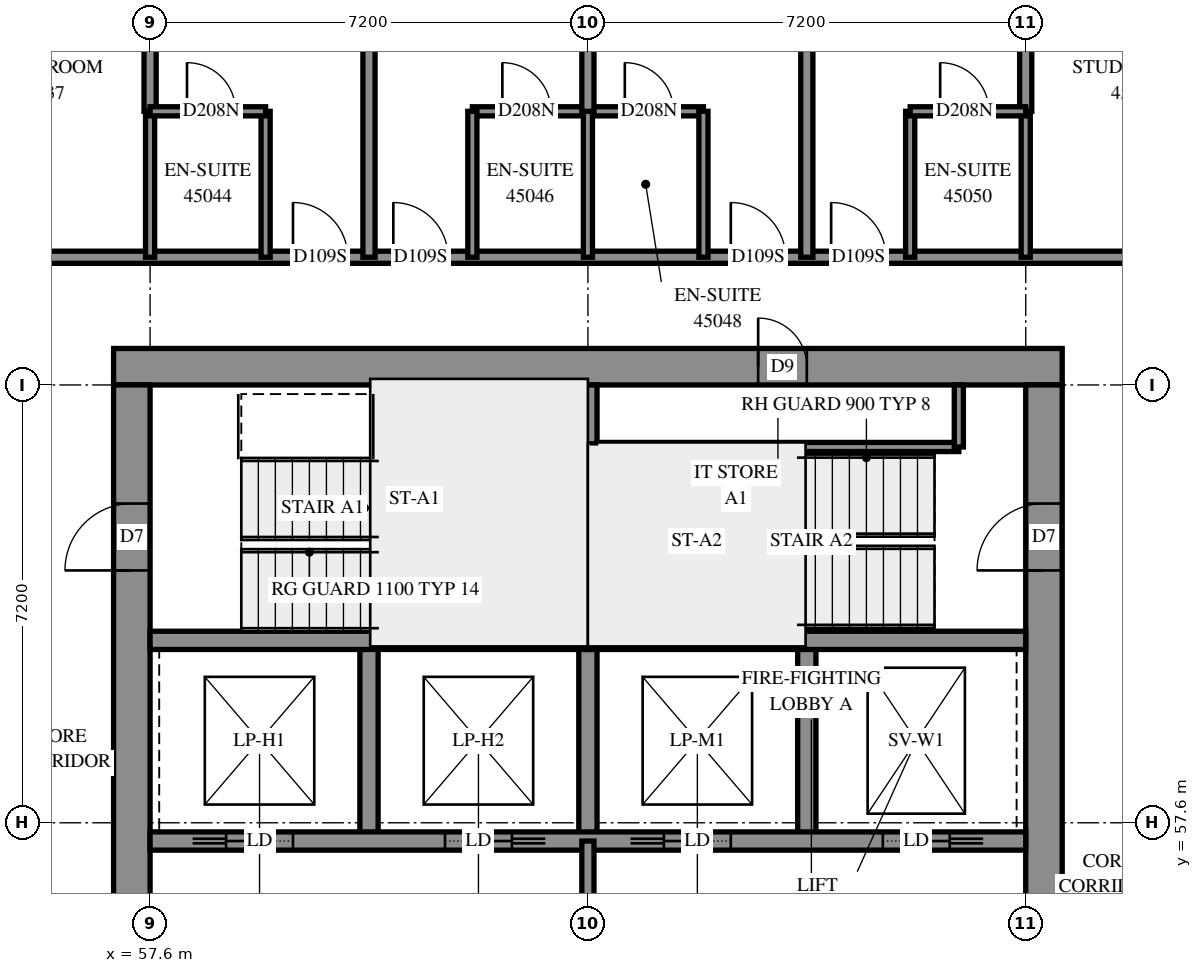
"""IFC4 building model, lengths in metres.
Left out: names, types, materials, properties, quantities, classifications, styles, units other than length and angle.
Written with IfcOpenShell. Run it as: python <this file> out.ifc"""

import sys

from ifc_helpers import new_model, si_unit, direction, frame, frame_2d, origin, place, context, subcontext, project, spatial, rectangle, extrude, element, fill, save


model = new_model("IFC4")
c1 = context("Model", 3, precision=1e-05, world=origin(), true_north=direction((0.0, 1.0)))
c2 = subcontext(c1, "Body", "Model", "MODEL_VIEW")
j1 = project(units=[si_unit("LENGTHUNIT", "METRE"), si_unit("PLANEANGLEUNIT", "RADIAN")], contexts=[c1])
p1 = place(None, origin())
s1 = spatial("IfcSite", under=j1, at=p1, CompositionType="ELEMENT")
p2 = place(p1, origin())
s2 = spatial("IfcBuilding", under=s1, at=p2, CompositionType="ELEMENT")
p3 = place(p2, frame((0.0, 0.0, 166.0)))
s3 = spatial("IfcBuildingStorey", under=s2, at=p3, CompositionType="ELEMENT", Elevation=166.0)
p4 = place(p3, frame((57.0, 65.1, -0.3), z_axis=(0.0, 0.0, 1.0), x_axis=(1.0, 0.0, 0.0)))
e1 = element("IfcWall", 1, at=p4, inside=s3, PredefinedType="SHEAR", context=c2, shape_type="SweptSolid", body=[
    extrude(rectangle(XDim=15.6, YDim=0.6, at=frame_2d((7.8, 0.0))), origin(), (0.0, 0.0, 1.0), 2.7),
])
p5 = place(p4, frame((10.6, 0.0, 0.3)))
e2 = element("IfcOpeningElement", 2, at=p5, cuts=e1, PredefinedType="OPENING", context=c2, shape_type="SweptSolid", body=[
    extrude(rectangle(XDim=0.8, YDim=2.1, at=frame_2d((0.4, 1.05))), frame((0.0, 0.31, 0.0), z_axis=(0.0, -1.0, 0.0), x_axis=(1.0, 0.0, 0.0)), (0.0, 0.0, 1.0), 0.62),
])
p6 = place(p3, frame((57.3, 50.4, -0.3), z_axis=(0.0, 0.0, 1.0), x_axis=(0.0, 1.0, 0.0)))
e3 = element("IfcWall", 3, at=p6, inside=s3, PredefinedType="SHEAR", context=c2, shape_type="SweptSolid", body=[
    extrude(rectangle(XDim=14.4, YDim=0.6, at=frame_2d((7.2, 0.0))), origin(), (0.0, 0.0, 1.0), 2.7),
])
p7 = place(p6, frame((4.55, 0.0, 0.3)))
e4 = element("IfcOpeningElement", 4, at=p7, cuts=e3, PredefinedType="OPENING", context=c2, shape_type="SweptSolid", body=[
    extrude(rectangle(XDim=1.1, YDim=2.1, at=frame_2d((0.55, 1.05))), frame((0.0, 0.31, 0.0), z_axis=(0.0, -1.0, 0.0), x_axis=(1.0, 0.0, 0.0)), (0.0, 0.0, 1.0), 0.62),
])
p8 = place(p6, frame((11.35, 0.0, 0.3)))
e5 = element("IfcOpeningElement", 5, at=p8, cuts=e3, PredefinedType="OPENING", context=c2, shape_type="SweptSolid", body=[
    extrude(rectangle(XDim=1.1, YDim=2.1, at=frame_2d((0.55, 1.05))), frame((0.0, 0.31, 0.0), z_axis=(0.0, -1.0, 0.0), x_axis=(1.0, 0.0, 0.0)), (0.0, 0.0, 1.0), 0.62),
])
p9 = place(p3, frame((72.3, 50.4, -0.3), z_axis=(0.0, 0.0, 1.0), x_axis=(0.0, 1.0, 0.0)))
e6 = element("IfcWall", 6, at=p9, inside=s3, PredefinedType="SHEAR", context=c2, shape_type="SweptSolid", body=[
    extrude(rectangle(XDim=14.4, YDim=0.6, at=frame_2d((7.2, 0.0))), origin(), (0.0, 0.0, 1.0), 2.7),
])
p10 = place(p9, frame((4.55, 0.0, 0.3)))
e7 = element("IfcOpeningElement", 7, at=p10, cuts=e6, PredefinedType="OPENING", context=c2, shape_type="SweptSolid", body=[
    extrude(rectangle(XDim=1.1, YDim=2.1, at=frame_2d((0.55, 1.05))), frame((0.0, 0.31, 0.0), z_axis=(0.0, -1.0, 0.0), x_axis=(1.0, 0.0, 0.0)), (0.0, 0.0, 1.0), 0.62),
])
p11 = place(p9, frame((11.35, 0.0, 0.3)))
e8 = element("IfcOpeningElement", 8, at=p11, cuts=e6, PredefinedType="OPENING", context=c2, shape_type="SweptSolid", body=[
    extrude(rectangle(XDim=1.1, YDim=2.1, at=frame_2d((0.55, 1.05))), frame((0.0, 0.31, 0.0), z_axis=(0.0, -1.0, 0.0), x_axis=(1.0, 0.0, 0.0)), (0.0, 0.0, 1.0), 0.62),
])
for number, where, z_axis, x_axis in (
    (9, (61.2, 57.3, 0.0), (0.0, 0.0, 1.0), (0.0, 1.0, 0.0)),
    (10, (64.8, 57.3, 0.0), (0.0, 0.0, 1.0), (0.0, 1.0, 0.0)),
    (11, (68.4, 57.3, 0.0), (0.0, 0.0, 1.0), (0.0, 1.0, 0.0)),
):
    element("IfcWall", number, at=place(p3, frame(where, z_axis=z_axis, x_axis=x_axis)), inside=s3, PredefinedType="SOLIDWALL", context=c2, shape_type="SweptSolid", body=[
        extrude(rectangle(XDim=3.3, YDim=0.3, at=frame_2d((1.65, 0.0))), origin(), (0.0, 0.0, 1.0), 3.1),
    ])
p12 = place(p3, frame((57.6, 57.3, 0.0), z_axis=(0.0, 0.0, 1.0), x_axis=(1.0, 0.0, 0.0)))
e12 = element("IfcWall", 12, at=p12, inside=s3, PredefinedType="SOLIDWALL", context=c2, shape_type="SweptSolid", body=[
    extrude(rectangle(XDim=14.4, YDim=0.3, at=frame_2d((7.2, 0.0))), origin(), (0.0, 0.0, 1.0), 3.1),
])
p13 = place(p12, frame((1.25, 0.0, 0.0)))
e13 = element("IfcOpeningElement", 13, at=p13, cuts=e12, PredefinedType="OPENING", context=c2, shape_type="SweptSolid", body=[
    extrude(rectangle(XDim=1.1, YDim=2.1, at=frame_2d((0.55, 1.05))), frame((0.0, 0.16, 0.0), z_axis=(0.0, -1.0, 0.0), x_axis=(1.0, 0.0, 0.0)), (0.0, 0.0, 1.0), 0.32),
])
p14 = place(p12, frame((4.85, 0.0, 0.0)))
e14 = element("IfcOpeningElement", 14, at=p14, cuts=e12, PredefinedType="OPENING", context=c2, shape_type="SweptSolid", body=[
    extrude(rectangle(XDim=1.1, YDim=2.1, at=frame_2d((0.55, 1.05))), frame((0.0, 0.16, 0.0), z_axis=(0.0, -1.0, 0.0), x_axis=(1.0, 0.0, 0.0)), (0.0, 0.0, 1.0), 0.32),
])
p15 = place(p12, frame((8.45, 0.0, 0.0)))
e15 = element("IfcOpeningElement", 15, at=p15, cuts=e12, PredefinedType="OPENING", context=c2, shape_type="SweptSolid", body=[
    extrude(rectangle(XDim=1.1, YDim=2.1, at=frame_2d((0.55, 1.05))), frame((0.0, 0.16, 0.0), z_axis=(0.0, -1.0, 0.0), x_axis=(1.0, 0.0, 0.0)), (0.0, 0.0, 1.0), 0.32),
])
p16 = place(p12, frame((12.05, 0.0, 0.0)))
e16 = element("IfcOpeningElement", 16, at=p16, cuts=e12, PredefinedType="OPENING", context=c2, shape_type="SweptSolid", body=[
    extrude(rectangle(XDim=1.1, YDim=2.1, at=frame_2d((0.55, 1.05))), frame((0.0, 0.16, 0.0), z_axis=(0.0, -1.0, 0.0), x_axis=(1.0, 0.0, 0.0)), (0.0, 0.0, 1.0), 0.32),
])
for number, where, z_axis, x_axis in (
    (17, (57.6, 60.6, 0.0), (0.0, 0.0, 1.0), (1.0, 0.0, 0.0)),
    (18, (64.8, 60.6, 0.0), (0.0, 0.0, 1.0), (1.0, 0.0, 0.0)),
):
    element("IfcWall", number, at=place(p3, frame(where, z_axis=z_axis, x_axis=x_axis)), inside=s3, PredefinedType="SOLIDWALL", context=c2, shape_type="SweptSolid", body=[
        extrude(rectangle(XDim=7.2, YDim=0.3, at=frame_2d((3.6, 0.0))), origin(), (0.0, 0.0, 1.0), 3.1),
    ])
p17 = place(p3, frame((64.8, 60.6, 0.0), z_axis=(0.0, 0.0, 1.0), x_axis=(0.0, 1.0, 0.0)))
e19 = element("IfcWall", 19, at=p17, inside=s3, PredefinedType="SOLIDWALL", context=c2, shape_type="SweptSolid", body=[
    extrude(rectangle(XDim=4.2, YDim=0.3, at=frame_2d((2.1, 0.0))), origin(), (0.0, 0.0, 1.0), 3.1),
])
p18 = place(p3, frame((64.95, 63.78, 0.0), z_axis=(0.0, 0.0, 1.0), x_axis=(1.0, 0.0, 0.0)))
e20 = element("IfcWall", 20, at=p18, inside=s3, PredefinedType="PARTITIONING", context=c2, shape_type="SweptSolid", body=[
    extrude(rectangle(XDim=5.95, YDim=0.15, at=frame_2d((2.975, 0.0))), origin(), (0.0, 0.0, 1.0), 3.1),
])
p19 = place(p3, frame((70.9, 63.78, 0.0), z_axis=(0.0, 0.0, 1.0), x_axis=(0.0, 1.0, 0.0)))
e21 = element("IfcWall", 21, at=p19, inside=s3, PredefinedType="PARTITIONING", context=c2, shape_type="SweptSolid", body=[
    extrude(rectangle(XDim=1.02, YDim=0.15, at=frame_2d((0.51, 0.0))), origin(), (0.0, 0.0, 1.0), 3.1),
])
p20 = place(p3, frame((64.8, 53.7, 0.0), z_axis=(0.0, 0.0, 1.0), x_axis=(0.0, 1.0, 0.0)))
e22 = element("IfcWall", 22, at=p20, inside=s3, PredefinedType="PARTITIONING", context=c2, shape_type="SweptSolid", body=[
    extrude(rectangle(XDim=3.6, YDim=0.2, at=frame_2d((1.8, 0.0))), origin(), (0.0, 0.0, 1.0), 3.1),
])
p21 = place(p3, frame((55.5, 66.9, 0.0), z_axis=(0.0, 0.0, 1.0), x_axis=(1.0, 0.0, 0.0)))
e23 = element("IfcWall", 23, at=p21, inside=s3, PredefinedType="PARTITIONING", context=c2, shape_type="SweptSolid", body=[
    extrude(rectangle(XDim=18.6, YDim=0.2, at=frame_2d((9.3, 0.0))), origin(), (0.0, 0.0, 1.0), 3.1),
])
p22 = place(p21, frame((4.45, 0.0, 0.0)))
e24 = element("IfcOpeningElement", 24, at=p22, cuts=e23, PredefinedType="OPENING", context=c2, shape_type="SweptSolid", body=[
    extrude(rectangle(XDim=0.9, YDim=2.1, at=frame_2d((0.45, 1.05))), frame((0.0, 0.11, 0.0), z_axis=(0.0, -1.0, 0.0), x_axis=(1.0, 0.0, 0.0)), (0.0, 0.0, 1.0), 0.22),
])
p23 = place(p21, frame((6.1, 0.0, 0.0)))
e25 = element("IfcOpeningElement", 25, at=p23, cuts=e23, PredefinedType="OPENING", context=c2, shape_type="SweptSolid", body=[
    extrude(rectangle(XDim=0.9, YDim=2.1, at=frame_2d((0.45, 1.05))), frame((0.0, 0.11, 0.0), z_axis=(0.0, -1.0, 0.0), x_axis=(1.0, 0.0, 0.0)), (0.0, 0.0, 1.0), 0.22),
])
p24 = place(p21, frame((11.65, 0.0, 0.0)))
e26 = element("IfcOpeningElement", 26, at=p24, cuts=e23, PredefinedType="OPENING", context=c2, shape_type="SweptSolid", body=[
    extrude(rectangle(XDim=0.9, YDim=2.1, at=frame_2d((0.45, 1.05))), frame((0.0, 0.11, 0.0), z_axis=(0.0, -1.0, 0.0), x_axis=(1.0, 0.0, 0.0)), (0.0, 0.0, 1.0), 0.22),
])
p25 = place(p21, frame((13.3, 0.0, 0.0)))
e27 = element("IfcOpeningElement", 27, at=p25, cuts=e23, PredefinedType="OPENING", context=c2, shape_type="SweptSolid", body=[
    extrude(rectangle(XDim=0.9, YDim=2.1, at=frame_2d((0.45, 1.05))), frame((0.0, 0.11, 0.0), z_axis=(0.0, -1.0, 0.0), x_axis=(1.0, 0.0, 0.0)), (0.0, 0.0, 1.0), 0.22),
])
p26 = place(p3, frame((68.4, 66.9, 0.0), z_axis=(0.0, 0.0, 1.0), x_axis=(0.0, 1.0, 0.0)))
e28 = element("IfcWall", 28, at=p26, inside=s3, PredefinedType="PARTITIONING", context=c2, shape_type="SweptSolid", body=[
    extrude(rectangle(XDim=5.848, YDim=0.2, at=frame_2d((2.924, 0.0))), origin(), (0.0, 0.0, 1.0), 3.1),
])
p27 = place(p3, frame((61.2, 66.9, 0.0), z_axis=(0.0, 0.0, 1.0), x_axis=(0.0, 1.0, 0.0)))
e29 = element("IfcWall", 29, at=p27, inside=s3, PredefinedType="PARTITIONING", context=c2, shape_type="SweptSolid", body=[
    extrude(rectangle(XDim=5.804, YDim=0.2, at=frame_2d((2.902, 0.0))), origin(), (0.0, 0.0, 1.0), 3.1),
])
p28 = place(p3, frame((62.9, 69.3, 0.0), z_axis=(0.0, 0.0, 1.0), x_axis=(1.0, 0.0, 0.0)))
e30 = element("IfcWall", 30, at=p28, inside=s3, PredefinedType="PARTITIONING", context=c2, shape_type="SweptSolid", body=[
    extrude(rectangle(XDim=3.8, YDim=0.15, at=frame_2d((1.9, 0.0))), origin(), (0.0, 0.0, 1.0), 3.1),
])
p29 = place(p28, frame((0.493, 0.0, 0.0)))
e31 = element("IfcOpeningElement", 31, at=p29, cuts=e30, PredefinedType="OPENING", context=c2, shape_type="SweptSolid", body=[
    extrude(rectangle(XDim=0.8, YDim=2.1, at=frame_2d((0.4, 1.05))), frame((0.0, 0.085, 0.0), z_axis=(0.0, -1.0, 0.0), x_axis=(1.0, 0.0, 0.0)), (0.0, 0.0, 1.0), 0.17),
])
p30 = place(p28, frame((2.507, 0.0, 0.0)))
e32 = element("IfcOpeningElement", 32, at=p30, cuts=e30, PredefinedType="OPENING", context=c2, shape_type="SweptSolid", body=[
    extrude(rectangle(XDim=0.8, YDim=2.1, at=frame_2d((0.4, 1.05))), frame((0.0, 0.085, 0.0), z_axis=(0.0, -1.0, 0.0), x_axis=(1.0, 0.0, 0.0)), (0.0, 0.0, 1.0), 0.17),
])
for number, where, z_axis, x_axis in (
    (33, (57.6, 66.9, 0.0), (0.0, 0.0, 1.0), (0.0, 1.0, 0.0)),
    (34, (59.5, 66.9, 0.0), (0.0, 0.0, 1.0), (0.0, 1.0, 0.0)),
    (35, (62.9, 66.9, 0.0), (0.0, 0.0, 1.0), (0.0, 1.0, 0.0)),
    (36, (64.8, 66.9, 0.0), (0.0, 0.0, 1.0), (0.0, 1.0, 0.0)),
    (37, (66.7, 66.9, 0.0), (0.0, 0.0, 1.0), (0.0, 1.0, 0.0)),
    (38, (70.1, 66.9, 0.0), (0.0, 0.0, 1.0), (0.0, 1.0, 0.0)),
    (39, (72.0, 66.9, 0.0), (0.0, 0.0, 1.0), (0.0, 1.0, 0.0)),
):
    element("IfcWall", number, at=place(p3, frame(where, z_axis=z_axis, x_axis=x_axis)), inside=s3, PredefinedType="PARTITIONING", context=c2, shape_type="SweptSolid", body=[
        extrude(rectangle(XDim=2.4, YDim=0.15, at=frame_2d((1.2, 0.0))), origin(), (0.0, 0.0, 1.0), 3.1),
    ])
for number, where, z_axis, x_axis in (
    (40, (57.6, 69.3, 0.0), (0.0, 0.0, 1.0), (0.0, 1.0, 0.0)),
    (41, (64.8, 69.3, 0.0), (0.0, 0.0, 1.0), (0.0, 1.0, 0.0)),
    (42, (72.0, 69.3, 0.0), (0.0, 0.0, 1.0), (0.0, 1.0, 0.0)),
):
    element("IfcWall", number, at=place(p3, frame(where, z_axis=z_axis, x_axis=x_axis)), inside=s3, PredefinedType="PARTITIONING", context=c2, shape_type="SweptSolid", body=[
        extrude(rectangle(XDim=2.25, YDim=0.2, at=frame_2d((1.125, 0.0))), origin(), (0.0, 0.0, 1.0), 3.1),
    ])
p31 = place(p3, frame((70.1, 69.3, 0.0), z_axis=(0.0, 0.0, 1.0), x_axis=(1.0, 0.0, 0.0)))
e43 = element("IfcWall", 43, at=p31, inside=s3, PredefinedType="PARTITIONING", context=c2, shape_type="SweptSolid", body=[
    extrude(rectangle(XDim=1.9, YDim=0.15, at=frame_2d((0.95, 0.0))), origin(), (0.0, 0.0, 1.0), 3.1),
])
p32 = place(p31, frame((0.493, 0.0, 0.0)))
e44 = element("IfcOpeningElement", 44, at=p32, cuts=e43, PredefinedType="OPENING", context=c2, shape_type="SweptSolid", body=[
    extrude(rectangle(XDim=0.8, YDim=2.1, at=frame_2d((0.4, 1.05))), frame((0.0, 0.085, 0.0), z_axis=(0.0, -1.0, 0.0), x_axis=(1.0, 0.0, 0.0)), (0.0, 0.0, 1.0), 0.17),
])
p33 = place(p3, frame((57.6, 69.3, 0.0), z_axis=(0.0, 0.0, 1.0), x_axis=(1.0, 0.0, 0.0)))
e45 = element("IfcWall", 45, at=p33, inside=s3, PredefinedType="PARTITIONING", context=c2, shape_type="SweptSolid", body=[
    extrude(rectangle(XDim=1.9, YDim=0.15, at=frame_2d((0.95, 0.0))), origin(), (0.0, 0.0, 1.0), 3.1),
])
p34 = place(p33, frame((0.607, 0.0, 0.0)))
e46 = element("IfcOpeningElement", 46, at=p34, cuts=e45, PredefinedType="OPENING", context=c2, shape_type="SweptSolid", body=[
    extrude(rectangle(XDim=0.8, YDim=2.1, at=frame_2d((0.4, 1.05))), frame((0.0, 0.085, 0.0), z_axis=(0.0, -1.0, 0.0), x_axis=(1.0, 0.0, 0.0)), (0.0, 0.0, 1.0), 0.17),
])
p35 = place(p5, origin())
e47 = element("IfcDoor", 47, at=p35, inside=s3, OperationType="SINGLE_SWING_RIGHT", PredefinedType="DOOR", context=c2, shape_type="SweptSolid", body=[
    extrude(rectangle(XDim=0.8, YDim=2.1, at=frame_2d((0.4, 1.05))), frame((0.0, 0.025, 0.0), z_axis=(0.0, -1.0, 0.0), x_axis=(1.0, 0.0, 0.0)), (0.0, 0.0, 1.0), 0.05),
])
fill(e2, e47)
p36 = place(p8, origin())
e48 = element("IfcDoor", 48, at=p36, inside=s3, OperationType="SINGLE_SWING_LEFT", PredefinedType="DOOR", context=c2, shape_type="SweptSolid", body=[
    extrude(rectangle(XDim=1.1, YDim=2.1, at=frame_2d((0.55, 1.05))), frame((0.0, 0.025, 0.0), z_axis=(0.0, -1.0, 0.0), x_axis=(1.0, 0.0, 0.0)), (0.0, 0.0, 1.0), 0.05),
])
fill(e5, e48)
p37 = place(p11, origin())
e49 = element("IfcDoor", 49, at=p37, inside=s3, OperationType="SINGLE_SWING_RIGHT", PredefinedType="DOOR", context=c2, shape_type="SweptSolid", body=[
    extrude(rectangle(XDim=1.1, YDim=2.1, at=frame_2d((0.55, 1.05))), frame((0.0, 0.025, 0.0), z_axis=(0.0, -1.0, 0.0), x_axis=(1.0, 0.0, 0.0)), (0.0, 0.0, 1.0), 0.05),
])
fill(e8, e49)
p38 = place(p13, origin())
e50 = element("IfcDoor", 50, at=p38, inside=s3, OperationType="SLIDING_TO_LEFT", PredefinedType="DOOR", context=c2, shape_type="SweptSolid", body=[
    extrude(rectangle(XDim=1.1, YDim=2.1, at=frame_2d((0.55, 1.05))), frame((0.0, 0.025, 0.0), z_axis=(0.0, -1.0, 0.0), x_axis=(1.0, 0.0, 0.0)), (0.0, 0.0, 1.0), 0.05),
])
fill(e13, e50)
p39 = place(p14, origin())
e51 = element("IfcDoor", 51, at=p39, inside=s3, OperationType="SLIDING_TO_RIGHT", PredefinedType="DOOR", context=c2, shape_type="SweptSolid", body=[
    extrude(rectangle(XDim=1.1, YDim=2.1, at=frame_2d((0.55, 1.05))), frame((0.0, 0.025, 0.0), z_axis=(0.0, -1.0, 0.0), x_axis=(1.0, 0.0, 0.0)), (0.0, 0.0, 1.0), 0.05),
])
fill(e14, e51)
p40 = place(p15, origin())
e52 = element("IfcDoor", 52, at=p40, inside=s3, OperationType="SLIDING_TO_LEFT", PredefinedType="DOOR", context=c2, shape_type="SweptSolid", body=[
    extrude(rectangle(XDim=1.1, YDim=2.1, at=frame_2d((0.55, 1.05))), frame((0.0, 0.025, 0.0), z_axis=(0.0, -1.0, 0.0), x_axis=(1.0, 0.0, 0.0)), (0.0, 0.0, 1.0), 0.05),
])
fill(e15, e52)
p41 = place(p16, origin())
e53 = element("IfcDoor", 53, at=p41, inside=s3, OperationType="SLIDING_TO_RIGHT", PredefinedType="DOOR", context=c2, shape_type="SweptSolid", body=[
    extrude(rectangle(XDim=1.1, YDim=2.1, at=frame_2d((0.55, 1.05))), frame((0.0, 0.025, 0.0), z_axis=(0.0, -1.0, 0.0), x_axis=(1.0, 0.0, 0.0)), (0.0, 0.0, 1.0), 0.05),
])
fill(e16, e53)
p42 = place(p22, origin())
e54 = element("IfcDoor", 54, at=p42, inside=s3, OperationType="SINGLE_SWING_RIGHT", PredefinedType="DOOR", context=c2, shape_type="SweptSolid", body=[
    extrude(rectangle(XDim=0.9, YDim=2.1, at=frame_2d((0.45, 1.05))), frame((0.0, 0.025, 0.0), z_axis=(0.0, -1.0, 0.0), x_axis=(1.0, 0.0, 0.0)), (0.0, 0.0, 1.0), 0.05),
])
fill(e24, e54)
p43 = place(p34, origin())
e55 = element("IfcDoor", 55, at=p43, inside=s3, OperationType="SINGLE_SWING_RIGHT", PredefinedType="DOOR", context=c2, shape_type="SweptSolid", body=[
    extrude(rectangle(XDim=0.8, YDim=2.1, at=frame_2d((0.4, 1.05))), frame((0.0, 0.025, 0.0), z_axis=(0.0, -1.0, 0.0), x_axis=(1.0, 0.0, 0.0)), (0.0, 0.0, 1.0), 0.05),
])
fill(e46, e55)
p44 = place(p23, origin())
e56 = element("IfcDoor", 56, at=p44, inside=s3, OperationType="SINGLE_SWING_LEFT", PredefinedType="DOOR", context=c2, shape_type="SweptSolid", body=[
    extrude(rectangle(XDim=0.9, YDim=2.1, at=frame_2d((0.45, 1.05))), frame((0.0, 0.025, 0.0), z_axis=(0.0, -1.0, 0.0), x_axis=(1.0, 0.0, 0.0)), (0.0, 0.0, 1.0), 0.05),
])
fill(e25, e56)
p45 = place(p29, origin())
e57 = element("IfcDoor", 57, at=p45, inside=s3, OperationType="SINGLE_SWING_RIGHT", PredefinedType="DOOR", context=c2, shape_type="SweptSolid", body=[
    extrude(rectangle(XDim=0.8, YDim=2.1, at=frame_2d((0.4, 1.05))), frame((0.0, 0.025, 0.0), z_axis=(0.0, -1.0, 0.0), x_axis=(1.0, 0.0, 0.0)), (0.0, 0.0, 1.0), 0.05),
])
fill(e31, e57)
p46 = place(p24, origin())
e58 = element("IfcDoor", 58, at=p46, inside=s3, OperationType="SINGLE_SWING_RIGHT", PredefinedType="DOOR", context=c2, shape_type="SweptSolid", body=[
    extrude(rectangle(XDim=0.9, YDim=2.1, at=frame_2d((0.45, 1.05))), frame((0.0, 0.025, 0.0), z_axis=(0.0, -1.0, 0.0), x_axis=(1.0, 0.0, 0.0)), (0.0, 0.0, 1.0), 0.05),
])
fill(e26, e58)
p47 = place(p30, origin())
e59 = element("IfcDoor", 59, at=p47, inside=s3, OperationType="SINGLE_SWING_RIGHT", PredefinedType="DOOR", context=c2, shape_type="SweptSolid", body=[
    extrude(rectangle(XDim=0.8, YDim=2.1, at=frame_2d((0.4, 1.05))), frame((0.0, 0.025, 0.0), z_axis=(0.0, -1.0, 0.0), x_axis=(1.0, 0.0, 0.0)), (0.0, 0.0, 1.0), 0.05),
])
fill(e32, e59)
p48 = place(p25, origin())
e60 = element("IfcDoor", 60, at=p48, inside=s3, OperationType="SINGLE_SWING_LEFT", PredefinedType="DOOR", context=c2, shape_type="SweptSolid", body=[
    extrude(rectangle(XDim=0.9, YDim=2.1, at=frame_2d((0.45, 1.05))), frame((0.0, 0.025, 0.0), z_axis=(0.0, -1.0, 0.0), x_axis=(1.0, 0.0, 0.0)), (0.0, 0.0, 1.0), 0.05),
])
fill(e27, e60)
p49 = place(p32, origin())
e61 = element("IfcDoor", 61, at=p49, inside=s3, OperationType="SINGLE_SWING_RIGHT", PredefinedType="DOOR", context=c2, shape_type="SweptSolid", body=[
    extrude(rectangle(XDim=0.8, YDim=2.1, at=frame_2d((0.4, 1.05))), frame((0.0, 0.025, 0.0), z_axis=(0.0, -1.0, 0.0), x_axis=(1.0, 0.0, 0.0)), (0.0, 0.0, 1.0), 0.05),
])
fill(e44, e61)
save(model, sys.argv[1])
